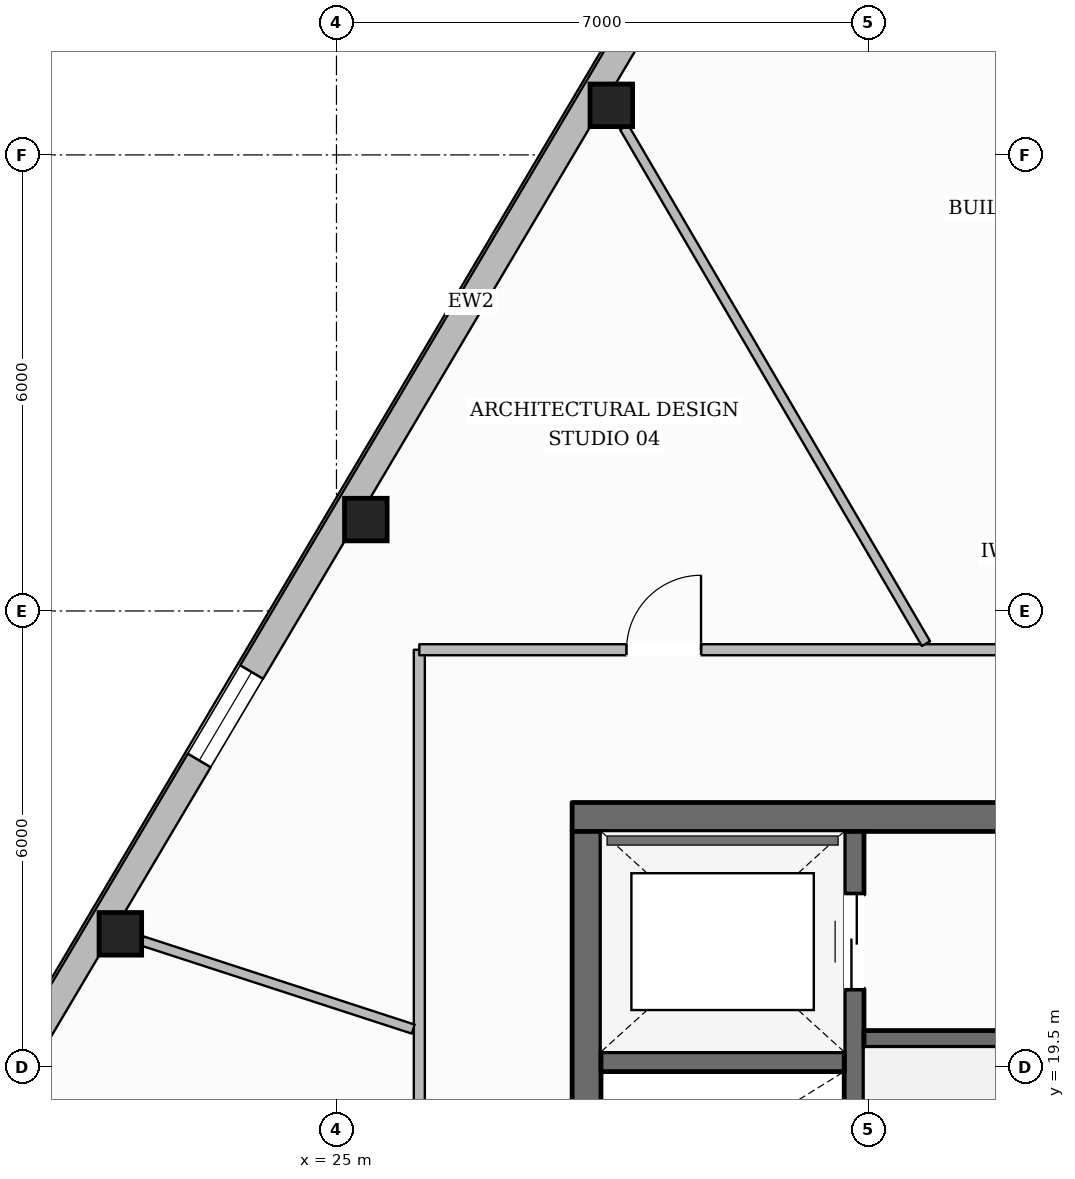
"""IFC4 building model, lengths in metres.
Left out: names, types, materials, properties, quantities, classifications, styles, units other than length and angle.
Written with IfcOpenShell. Run it as: python <this file> out.ifc"""

import sys

from ifc_helpers import new_model, si_unit, direction, frame, frame_2d, origin, origin_2d, place, context, subcontext, project, spatial, rectangle, hollow_rectangle, extrude, element, fill, save


model = new_model("IFC4")
c1 = context("Model", 3, precision=1e-05, world=origin(), true_north=direction((0.0, 1.0)))
c2 = subcontext(c1, "Body", "Model", "MODEL_VIEW")
j1 = project(units=[si_unit("LENGTHUNIT", "METRE"), si_unit("PLANEANGLEUNIT", "RADIAN")], contexts=[c1])
p1 = place(None, origin())
s1 = spatial("IfcSite", under=j1, at=p1, CompositionType="ELEMENT")
p2 = place(p1, origin())
s2 = spatial("IfcBuilding", under=s1, at=p2, CompositionType="ELEMENT")
p3 = place(p2, frame((0.0, 0.0, 281.85)))
s3 = spatial("IfcBuildingStorey", under=s2, at=p3, CompositionType="ELEMENT", Elevation=281.85)
p4 = place(p3, frame((28.1, 22.79, 0.0), z_axis=(0.0, 0.0, 1.0), x_axis=(1.0, 0.0, 0.0)))
e1 = element("IfcWall", 1, at=p4, inside=s3, PredefinedType="SOLIDWALL", context=c2, shape_type="SweptSolid", body=[
    extrude(rectangle(XDim=19.8, YDim=0.38, at=frame_2d((9.9, 0.0))), origin(), (0.0, 0.0, 1.0), 3.61),
])
p5 = place(p4, frame((6.175, 0.0, 0.0)))
e2 = element("IfcOpeningElement", 2, at=p5, cuts=e1, PredefinedType="OPENING", context=c2, shape_type="SweptSolid", body=[
    extrude(rectangle(XDim=1.05, YDim=2.15, at=frame_2d((0.525, 1.075))), frame((0.0, 0.2, 0.0), z_axis=(0.0, -1.0, 0.0), x_axis=(1.0, 0.0, 0.0)), (0.0, 0.0, 1.0), 0.4),
])
p6 = place(p4, frame((12.575, 0.0, 0.0)))
e3 = element("IfcOpeningElement", 3, at=p6, cuts=e1, PredefinedType="OPENING", context=c2, shape_type="SweptSolid", body=[
    extrude(rectangle(XDim=1.05, YDim=2.15, at=frame_2d((0.525, 1.075))), frame((0.0, 0.2, 0.0), z_axis=(0.0, -1.0, 0.0), x_axis=(1.0, 0.0, 0.0)), (0.0, 0.0, 1.0), 0.4),
])
p7 = place(p3, frame((28.29, 9.6, 0.0), z_axis=(0.0, 0.0, 1.0), x_axis=(0.0, 1.0, 0.0)))
e4 = element("IfcWall", 4, at=p7, inside=s3, PredefinedType="SOLIDWALL", context=c2, shape_type="SweptSolid", body=[
    extrude(rectangle(XDim=13.0, YDim=0.38, at=frame_2d((6.5, 0.0))), origin(), (0.0, 0.0, 1.0), 3.61),
])
p8 = place(p7, frame((0.2, 0.0, 0.0)))
e5 = element("IfcOpeningElement", 5, at=p8, cuts=e4, PredefinedType="OPENING", context=c2, shape_type="SweptSolid", body=[
    extrude(rectangle(XDim=1.1, YDim=2.15, at=frame_2d((0.55, 1.075))), frame((0.0, 0.2, 0.0), z_axis=(0.0, -1.0, 0.0), x_axis=(1.0, 0.0, 0.0)), (0.0, 0.0, 1.0), 0.4),
])
p9 = place(p7, frame((8.4, 0.0, 0.0)))
e6 = element("IfcOpeningElement", 6, at=p9, cuts=e4, PredefinedType="OPENING", context=c2, shape_type="SweptSolid", body=[
    extrude(rectangle(XDim=0.9, YDim=2.1, at=frame_2d((0.45, 1.05))), frame((0.0, 0.2, 0.0), z_axis=(0.0, -1.0, 0.0), x_axis=(1.0, 0.0, 0.0)), (0.0, 0.0, 1.0), 0.4),
])
p10 = place(p3, frame((31.81, 9.6, 0.0), z_axis=(0.0, 0.0, 1.0), x_axis=(0.0, 1.0, 0.0)))
e7 = element("IfcWall", 7, at=p10, inside=s3, PredefinedType="SHEAR", context=c2, shape_type="SweptSolid", body=[
    extrude(rectangle(XDim=13.0, YDim=0.26, at=frame_2d((6.5, 0.0))), origin(), (0.0, 0.0, 1.0), 3.61),
])
p11 = place(p10, frame((10.925, 0.0, 0.0)))
e8 = element("IfcOpeningElement", 8, at=p11, cuts=e7, PredefinedType="OPENING", context=c2, shape_type="SweptSolid", body=[
    extrude(rectangle(XDim=1.25, YDim=2.25, at=frame_2d((0.625, 1.125))), frame((0.0, 0.14, 0.0), z_axis=(0.0, -1.0, 0.0), x_axis=(1.0, 0.0, 0.0)), (0.0, 0.0, 1.0), 0.28),
])
p12 = place(p3, frame((28.48, 19.57, 0.0), z_axis=(0.0, 0.0, 1.0), x_axis=(1.0, 0.0, 0.0)))
e9 = element("IfcWall", 9, at=p12, inside=s3, PredefinedType="SHEAR", context=c2, shape_type="SweptSolid", body=[
    extrude(rectangle(XDim=3.2, YDim=0.26, at=frame_2d((1.6, 0.0))), origin(), (0.0, 0.0, 1.0), 3.61),
])
p13 = place(p3, frame((31.94, 19.87, 0.0), z_axis=(0.0, 0.0, 1.0), x_axis=(1.0, 0.0, 0.0)))
e10 = element("IfcWall", 10, at=p13, inside=s3, PredefinedType="SOLIDWALL", context=c2, shape_type="SweptSolid", body=[
    extrude(rectangle(XDim=12.12, YDim=0.22, at=frame_2d((6.06, 0.0))), origin(), (0.0, 0.0, 1.0), 3.61),
])
p14 = place(p13, frame((6.3, 0.0, 0.0)))
e11 = element("IfcOpeningElement", 11, at=p14, cuts=e10, PredefinedType="OPENING", context=c2, shape_type="SweptSolid", body=[
    extrude(rectangle(XDim=1.1, YDim=2.15, at=frame_2d((0.55, 1.075))), frame((0.0, 0.12, 0.0), z_axis=(0.0, -1.0, 0.0), x_axis=(1.0, 0.0, 0.0)), (0.0, 0.0, 1.0), 0.24),
])
p15 = place(p13, frame((8.61, 0.0, 0.0)))
e12 = element("IfcOpeningElement", 12, at=p15, cuts=e10, PredefinedType="OPENING", context=c2, shape_type="SweptSolid", body=[
    extrude(rectangle(XDim=0.9, YDim=2.1, at=frame_2d((0.45, 1.05))), frame((0.0, 0.12, 0.0), z_axis=(0.0, -1.0, 0.0), x_axis=(1.0, 0.0, 0.0)), (0.0, 0.0, 1.0), 0.24),
])
p16 = place(p13, frame((10.85, 0.0, 0.0)))
e13 = element("IfcOpeningElement", 13, at=p16, cuts=e10, PredefinedType="OPENING", context=c2, shape_type="SweptSolid", body=[
    extrude(rectangle(XDim=0.9, YDim=2.1, at=frame_2d((0.45, 1.05))), frame((0.0, 0.12, 0.0), z_axis=(0.0, -1.0, 0.0), x_axis=(1.0, 0.0, 0.0)), (0.0, 0.0, 1.0), 0.24),
])
for number, where, z_axis, x_axis in (
    (14, (28.616, 32.153, 0.0), (0.0, 0.0, 1.0), (1.0, 0.0, 0.0)),
    (15, (25.386, 26.702, 0.0), (0.0, 0.0, 1.0), (1.0, 0.0, 0.0)),
    (16, (22.156, 21.252, 0.0), (0.0, 0.0, 1.0), (1.0, 0.0, 0.0)),
):
    element("IfcColumn", number, at=place(p3, frame(where, z_axis=z_axis, x_axis=x_axis)), inside=s3, PredefinedType="COLUMN", context=c2, shape_type="SweptSolid", body=[
        extrude(hollow_rectangle(XDim=0.56, YDim=0.56, WallThickness=0.025, at=origin_2d()), origin(), (0.0, 0.0, 1.0), 3.61),
    ])
p17 = place(p3, frame((15.219, 10.076, 0.0), z_axis=(0.0, 0.0, 1.0), x_axis=(0.509799642177, 0.860293162147, 0.0)))
e17 = element("IfcWall", 17, at=p17, inside=s3, PredefinedType="STANDARD", context=c2, shape_type="SweptSolid", body=[
    extrude(rectangle(XDim=38.963, YDim=0.35, at=frame_2d((19.481, 0.0))), origin(), (0.0, 0.0, 1.0), 3.196),
])
p18 = place(p17, frame((34.65, 0.0, 0.65)))
e18 = element("IfcOpeningElement", 18, at=p18, cuts=e17, PredefinedType="OPENING", context=c2, shape_type="SweptSolid", body=[
    extrude(rectangle(XDim=1.35, YDim=1.75, at=frame_2d((0.675, 0.875))), frame((0.0, 0.185, 0.0), z_axis=(0.0, -1.0, 0.0), x_axis=(1.0, 0.0, 0.0)), (0.0, 0.0, 1.0), 0.37),
])
p19 = place(p17, frame((28.314, 0.0, 0.65)))
e19 = element("IfcOpeningElement", 19, at=p19, cuts=e17, PredefinedType="OPENING", context=c2, shape_type="SweptSolid", body=[
    extrude(rectangle(XDim=1.35, YDim=1.75, at=frame_2d((0.675, 0.875))), frame((0.0, 0.185, 0.0), z_axis=(0.0, -1.0, 0.0), x_axis=(1.0, 0.0, 0.0)), (0.0, 0.0, 1.0), 0.37),
])
p20 = place(p17, frame((15.645, 0.0, 0.65)))
e20 = element("IfcOpeningElement", 20, at=p20, cuts=e17, PredefinedType="OPENING", context=c2, shape_type="SweptSolid", body=[
    extrude(rectangle(XDim=1.35, YDim=1.75, at=frame_2d((0.675, 0.875))), frame((0.0, 0.185, 0.0), z_axis=(0.0, -1.0, 0.0), x_axis=(1.0, 0.0, 0.0)), (0.0, 0.0, 1.0), 0.37),
])
p21 = place(p17, frame((9.309, 0.0, 0.65)))
e21 = element("IfcOpeningElement", 21, at=p21, cuts=e17, PredefinedType="OPENING", context=c2, shape_type="SweptSolid", body=[
    extrude(rectangle(XDim=1.35, YDim=1.75, at=frame_2d((0.675, 0.875))), frame((0.0, 0.185, 0.0), z_axis=(0.0, -1.0, 0.0), x_axis=(1.0, 0.0, 0.0)), (0.0, 0.0, 1.0), 0.37),
])
p22 = place(p17, frame((2.974, 0.0, 0.65)))
e22 = element("IfcOpeningElement", 22, at=p22, cuts=e17, PredefinedType="OPENING", context=c2, shape_type="SweptSolid", body=[
    extrude(rectangle(XDim=1.35, YDim=1.75, at=frame_2d((0.675, 0.875))), frame((0.0, 0.185, 0.0), z_axis=(0.0, -1.0, 0.0), x_axis=(1.0, 0.0, 0.0)), (0.0, 0.0, 1.0), 0.37),
])
p23 = place(p3, frame((26.09, 7.21, 0.0), z_axis=(0.0, 0.0, 1.0), x_axis=(0.0, 1.0, 0.0)))
e23 = element("IfcWall", 23, at=p23, inside=s3, PredefinedType="PARTITIONING", context=c2, shape_type="SweptSolid", body=[
    extrude(rectangle(XDim=17.78, YDim=0.145, at=frame_2d((8.89, 0.0))), origin(), (0.0, 0.0, 1.0), 3.349),
])
p24 = place(p23, frame((5.989, 0.0, 0.0)))
e24 = element("IfcOpeningElement", 24, at=p24, cuts=e23, PredefinedType="OPENING", context=c2, shape_type="SweptSolid", body=[
    extrude(rectangle(XDim=0.98, YDim=2.15, at=frame_2d((0.49, 1.075))), frame((0.0, 0.083, 0.0), z_axis=(0.0, -1.0, 0.0), x_axis=(1.0, 0.0, 0.0)), (0.0, 0.0, 1.0), 0.165),
])
p25 = place(p3, frame((26.09, 24.99, 0.0), z_axis=(0.0, 0.0, 1.0), x_axis=(1.0, 0.0, 0.0)))
e25 = element("IfcWall", 25, at=p25, inside=s3, PredefinedType="PARTITIONING", context=c2, shape_type="SweptSolid", body=[
    extrude(rectangle(XDim=17.11, YDim=0.145, at=frame_2d((8.555, 0.0))), origin(), (0.0, 0.0, 1.0), 3.61),
])
p26 = place(p25, frame((8.47, 0.0, 0.0)))
e26 = element("IfcOpeningElement", 26, at=p26, cuts=e25, PredefinedType="OPENING", context=c2, shape_type="SweptSolid", body=[
    extrude(rectangle(XDim=0.88, YDim=2.1, at=frame_2d((0.44, 1.05))), frame((0.0, 0.083, 0.0), z_axis=(0.0, -1.0, 0.0), x_axis=(1.0, 0.0, 0.0)), (0.0, 0.0, 1.0), 0.165),
])
p27 = place(p25, frame((10.99, 0.0, 0.0)))
e27 = element("IfcOpeningElement", 27, at=p27, cuts=e25, PredefinedType="OPENING", context=c2, shape_type="SweptSolid", body=[
    extrude(rectangle(XDim=0.88, YDim=2.1, at=frame_2d((0.44, 1.05))), frame((0.0, 0.083, 0.0), z_axis=(0.0, -1.0, 0.0), x_axis=(1.0, 0.0, 0.0)), (0.0, 0.0, 1.0), 0.165),
])
p28 = place(p25, frame((13.37, 0.0, 0.0)))
e28 = element("IfcOpeningElement", 28, at=p28, cuts=e25, PredefinedType="OPENING", context=c2, shape_type="SweptSolid", body=[
    extrude(rectangle(XDim=0.96, YDim=2.1, at=frame_2d((0.48, 1.05))), frame((0.0, 0.083, 0.0), z_axis=(0.0, -1.0, 0.0), x_axis=(1.0, 0.0, 0.0)), (0.0, 0.0, 1.0), 0.165),
])
p29 = place(p25, frame((2.726, 0.0, 0.0)))
e29 = element("IfcOpeningElement", 29, at=p29, cuts=e25, PredefinedType="OPENING", context=c2, shape_type="SweptSolid", body=[
    extrude(rectangle(XDim=0.98, YDim=2.15, at=frame_2d((0.49, 1.075))), frame((0.0, 0.083, 0.0), z_axis=(0.0, -1.0, 0.0), x_axis=(1.0, 0.0, 0.0)), (0.0, 0.0, 1.0), 0.165),
])
p30 = place(p3, frame((32.756, 25.071, 0.0), z_axis=(0.0, 0.0, 1.0), x_axis=(-0.50468093624, 0.863305943797, 0.0)))
e30 = element("IfcWall", 30, at=p30, inside=s3, PredefinedType="PARTITIONING", context=c2, shape_type="SweptSolid", body=[
    extrude(rectangle(XDim=7.87, YDim=0.125, at=frame_2d((3.935, 0.0))), origin(), (0.0, 0.0, 1.0), 3.246),
])
p31 = place(p3, frame((26.01, 20.0, 0.0), z_axis=(0.0, 0.0, 1.0), x_axis=(-0.950989069634, 0.309224496824, 0.0)))
e31 = element("IfcWall", 31, at=p31, inside=s3, PredefinedType="PARTITIONING", context=c2, shape_type="SweptSolid", body=[
    extrude(rectangle(XDim=3.749, YDim=0.125, at=frame_2d((1.875, 0.0))), origin(), (0.0, 0.0, 1.0), 3.61),
])
p32 = place(p20, origin())
e32 = element("IfcWindow", 32, at=p32, inside=s3, PartitioningType="SINGLE_PANEL", PredefinedType="WINDOW", context=c2, shape_type="SweptSolid", body=[
    extrude(rectangle(XDim=1.35, YDim=1.75, at=frame_2d((0.675, 0.875))), frame((0.0, 0.03, 0.0), z_axis=(0.0, -1.0, 0.0), x_axis=(1.0, 0.0, 0.0)), (0.0, 0.0, 1.0), 0.06),
])
fill(e20, e32)
p33 = place(p11, origin())
e33 = element("IfcDoor", 33, at=p33, inside=s3, OperationType="DOUBLE_DOOR_SLIDING", PredefinedType="DOOR", context=c2, shape_type="SweptSolid", body=[
    extrude(rectangle(XDim=1.25, YDim=2.25, at=frame_2d((0.625, 1.125))), frame((0.0, 0.025, 0.0), z_axis=(0.0, -1.0, 0.0), x_axis=(1.0, 0.0, 0.0)), (0.0, 0.0, 1.0), 0.05),
])
fill(e8, e33)
p34 = place(p29, origin())
e34 = element("IfcDoor", 34, at=p34, inside=s3, OperationType="SINGLE_SWING_RIGHT", PredefinedType="DOOR", context=c2, shape_type="SweptSolid", body=[
    extrude(rectangle(XDim=0.98, YDim=2.15, at=frame_2d((0.49, 1.075))), frame((0.0, 0.025, 0.0), z_axis=(0.0, -1.0, 0.0), x_axis=(1.0, 0.0, 0.0)), (0.0, 0.0, 1.0), 0.05),
])
fill(e29, e34)
save(model, sys.argv[1])
